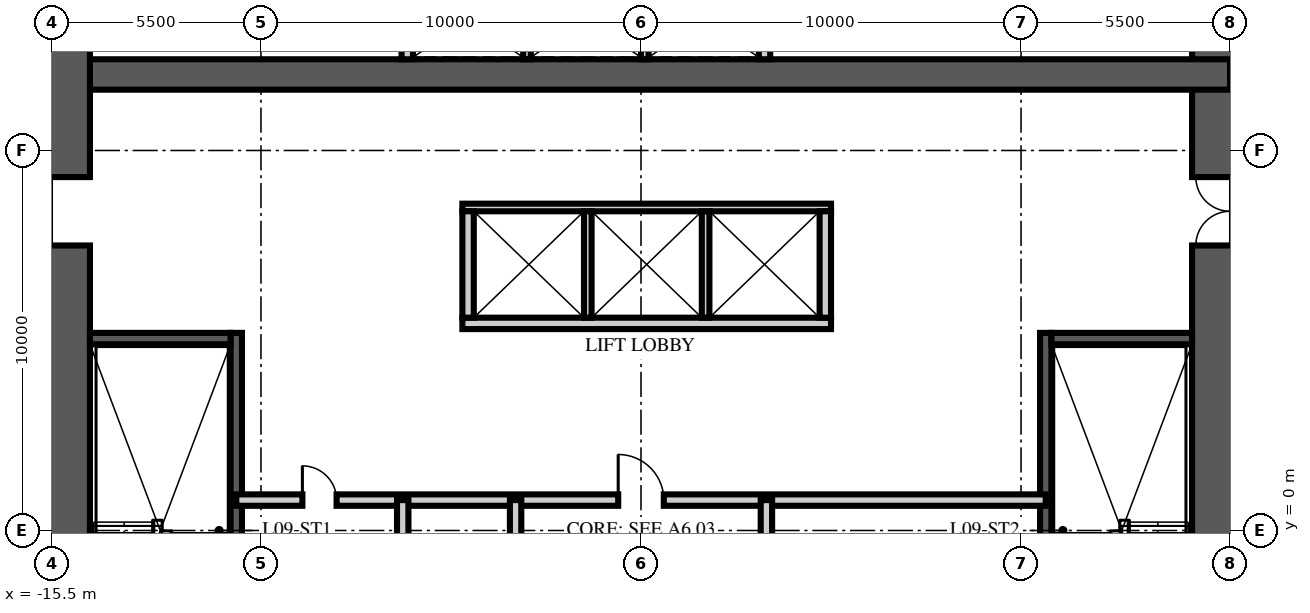
"""IFC4 building model, lengths in metres.
Left out: names, types, materials, properties, quantities, classifications, styles, units other than length and angle.
Written with IfcOpenShell. Run it as: python <this file> out.ifc"""

import sys

from ifc_helpers import new_model, si_unit, direction, frame, frame_2d, origin, place, context, subcontext, project, spatial, rectangle, extrude, element, fill, save


model = new_model("IFC4")
c1 = context("Model", 3, precision=1e-05, world=origin(), true_north=direction((0.0, 1.0)))
c2 = subcontext(c1, "Body", "Model", "MODEL_VIEW")
j1 = project(units=[si_unit("LENGTHUNIT", "METRE"), si_unit("PLANEANGLEUNIT", "RADIAN")], contexts=[c1])
p1 = place(None, origin())
s1 = spatial("IfcSite", under=j1, at=p1, CompositionType="ELEMENT")
p2 = place(p1, origin())
s2 = spatial("IfcBuilding", under=s1, at=p2, CompositionType="ELEMENT")
p3 = place(p2, frame((0.0, 0.0, 39.75)))
s3 = spatial("IfcBuildingStorey", under=s2, at=p3, CompositionType="ELEMENT", Elevation=39.75)
p4 = place(p3, frame((15.5, -15.5, -0.25), z_axis=(0.0, 0.0, 1.0), x_axis=(0.0, 1.0, 0.0)))
e1 = element("IfcWall", 1, at=p4, inside=s3, PredefinedType="SHEAR", context=c2, shape_type="SweptSolid", body=[
    extrude(rectangle(XDim=31.0, YDim=2.0, at=frame_2d((15.5, 0.0))), origin(), (0.0, 0.0, 1.0), 3.75),
])
p5 = place(p4, frame((6.5, 0.0, 0.25)))
e2 = element("IfcOpeningElement", 2, at=p5, cuts=e1, PredefinedType="OPENING", context=c2, shape_type="SweptSolid", body=[
    extrude(rectangle(XDim=1.2, YDim=2.1, at=frame_2d((0.6, 1.05))), frame((0.0, 1.01, 0.0), z_axis=(0.0, -1.0, 0.0), x_axis=(1.0, 0.0, 0.0)), (0.0, 0.0, 1.0), 2.02),
])
p6 = place(p4, frame((23.0, 0.0, 0.25)))
e3 = element("IfcOpeningElement", 3, at=p6, cuts=e1, PredefinedType="OPENING", context=c2, shape_type="SweptSolid", body=[
    extrude(rectangle(XDim=1.8, YDim=2.1, at=frame_2d((0.9, 1.05))), frame((0.0, 1.01, 0.0), z_axis=(0.0, -1.0, 0.0), x_axis=(1.0, 0.0, 0.0)), (0.0, 0.0, 1.0), 2.02),
])
p7 = place(p3, frame((-15.5, 12.0, -0.25), z_axis=(0.0, 0.0, 1.0), x_axis=(1.0, 0.0, 0.0)))
e4 = element("IfcWall", 4, at=p7, inside=s3, PredefinedType="SHEAR", context=c2, shape_type="SweptSolid", body=[
    extrude(rectangle(XDim=31.0, YDim=0.8, at=frame_2d((15.5, 0.0))), origin(), (0.0, 0.0, 1.0), 3.75),
])
p8 = place(p3, frame((-15.5, -15.5, -0.25), z_axis=(0.0, 0.0, 1.0), x_axis=(0.0, 1.0, 0.0)))
e5 = element("IfcWall", 5, at=p8, inside=s3, PredefinedType="SHEAR", context=c2, shape_type="SweptSolid", body=[
    extrude(rectangle(XDim=31.0, YDim=2.0, at=frame_2d((15.5, 0.0))), origin(), (0.0, 0.0, 1.0), 3.75),
])
p9 = place(p8, frame((6.5, 0.0, 0.25)))
e6 = element("IfcOpeningElement", 6, at=p9, cuts=e5, PredefinedType="OPENING", context=c2, shape_type="SweptSolid", body=[
    extrude(rectangle(XDim=1.2, YDim=2.1, at=frame_2d((0.6, 1.05))), frame((0.0, 1.01, 0.0), z_axis=(0.0, -1.0, 0.0), x_axis=(1.0, 0.0, 0.0)), (0.0, 0.0, 1.0), 2.02),
])
p10 = place(p8, frame((23.0, 0.0, 0.25)))
e7 = element("IfcOpeningElement", 7, at=p10, cuts=e5, PredefinedType="OPENING", context=c2, shape_type="SweptSolid", body=[
    extrude(rectangle(XDim=1.8, YDim=2.1, at=frame_2d((0.9, 1.05))), frame((0.0, 1.01, 0.0), z_axis=(0.0, -1.0, 0.0), x_axis=(1.0, 0.0, 0.0)), (0.0, 0.0, 1.0), 2.02),
])
p11 = place(p3, frame((-10.65, -4.9, 0.0), z_axis=(0.0, 0.0, 1.0), x_axis=(0.0, 1.0, 0.0)))
e8 = element("IfcWall", 8, at=p11, inside=s3, PredefinedType="SOLIDWALL", context=c2, shape_type="SweptSolid", body=[
    extrude(rectangle(XDim=10.1, YDim=0.3, at=frame_2d((5.05, 0.0))), origin(), (0.0, 0.0, 1.0), 3.5),
])
p12 = place(p3, frame((-14.5, 5.05, 0.0), z_axis=(0.0, 0.0, 1.0), x_axis=(1.0, 0.0, 0.0)))
e9 = element("IfcWall", 9, at=p12, inside=s3, PredefinedType="SOLIDWALL", context=c2, shape_type="SweptSolid", body=[
    extrude(rectangle(XDim=3.7, YDim=0.3, at=frame_2d((1.85, 0.0))), origin(), (0.0, 0.0, 1.0), 3.5),
])
p13 = place(p3, frame((10.65, -4.9, 0.0), z_axis=(0.0, 0.0, 1.0), x_axis=(0.0, 1.0, 0.0)))
e10 = element("IfcWall", 10, at=p13, inside=s3, PredefinedType="SOLIDWALL", context=c2, shape_type="SweptSolid", body=[
    extrude(rectangle(XDim=10.1, YDim=0.3, at=frame_2d((5.05, 0.0))), origin(), (0.0, 0.0, 1.0), 3.5),
])
p14 = place(p3, frame((14.5, 5.05, 0.0), z_axis=(0.0, 0.0, 1.0), x_axis=(-1.0, 0.0, 0.0)))
e11 = element("IfcWall", 11, at=p14, inside=s3, PredefinedType="SOLIDWALL", context=c2, shape_type="SweptSolid", body=[
    extrude(rectangle(XDim=3.7, YDim=0.3, at=frame_2d((1.85, 0.0))), origin(), (0.0, 0.0, 1.0), 3.5),
])
p15 = place(p3, frame((-4.7, 5.45, 0.0), z_axis=(0.0, 0.0, 1.0), x_axis=(1.0, 0.0, 0.0)))
e12 = element("IfcWall", 12, at=p15, inside=s3, PredefinedType="PARTITIONING", context=c2, shape_type="SweptSolid", body=[
    extrude(rectangle(XDim=9.7, YDim=0.3, at=frame_2d((4.85, 0.0))), origin(), (0.0, 0.0, 1.0), 3.5),
])
p16 = place(p3, frame((-4.7, 8.5, 0.0), z_axis=(0.0, 0.0, 1.0), x_axis=(1.0, 0.0, 0.0)))
e13 = element("IfcWall", 13, at=p16, inside=s3, PredefinedType="PARTITIONING", context=c2, shape_type="SweptSolid", body=[
    extrude(rectangle(XDim=9.7, YDim=0.2, at=frame_2d((4.85, 0.0))), origin(), (0.0, 0.0, 1.0), 3.5),
])
for number, where, z_axis, x_axis in (
    (14, (-4.55, 5.6, 0.0), (0.0, 0.0, 1.0), (0.0, 1.0, 0.0)),
    (15, (4.85, 5.6, 0.0), (0.0, 0.0, 1.0), (0.0, 1.0, 0.0)),
):
    element("IfcWall", number, at=place(p3, frame(where, z_axis=z_axis, x_axis=x_axis)), inside=s3, PredefinedType="PARTITIONING", context=c2, shape_type="SweptSolid", body=[
        extrude(rectangle(XDim=2.8, YDim=0.3, at=frame_2d((1.4, 0.0))), origin(), (0.0, 0.0, 1.0), 3.5),
    ])
for number, where, z_axis, x_axis in (
    (16, (-1.4, 5.6, 0.0), (0.0, 0.0, 1.0), (0.0, 1.0, 0.0)),
    (17, (1.7, 5.6, 0.0), (0.0, 0.0, 1.0), (0.0, 1.0, 0.0)),
):
    element("IfcWall", number, at=place(p3, frame(where, z_axis=z_axis, x_axis=x_axis)), inside=s3, PredefinedType="PARTITIONING", context=c2, shape_type="SweptSolid", body=[
        extrude(rectangle(XDim=2.8, YDim=0.2, at=frame_2d((1.4, 0.0))), origin(), (0.0, 0.0, 1.0), 3.5),
    ])
for number, where, z_axis, x_axis in (
    (18, (-6.15, 12.4, 0.0), (0.0, 0.0, 1.0), (0.0, 1.0, 0.0)),
    (19, (3.25, 12.4, 0.0), (0.0, 0.0, 1.0), (0.0, 1.0, 0.0)),
):
    element("IfcWall", number, at=place(p3, frame(where, z_axis=z_axis, x_axis=x_axis)), inside=s3, PredefinedType="PARTITIONING", context=c2, shape_type="SweptSolid", body=[
        extrude(rectangle(XDim=2.1, YDim=0.3, at=frame_2d((1.05, 0.0))), origin(), (0.0, 0.0, 1.0), 3.5),
    ])
for number, where, z_axis, x_axis in (
    (20, (-3.0, 12.4, 0.0), (0.0, 0.0, 1.0), (0.0, 1.0, 0.0)),
    (21, (0.1, 12.4, 0.0), (0.0, 0.0, 1.0), (0.0, 1.0, 0.0)),
):
    element("IfcWall", number, at=place(p3, frame(where, z_axis=z_axis, x_axis=x_axis)), inside=s3, PredefinedType="PARTITIONING", context=c2, shape_type="SweptSolid", body=[
        extrude(rectangle(XDim=2.1, YDim=0.2, at=frame_2d((1.05, 0.0))), origin(), (0.0, 0.0, 1.0), 3.5),
    ])
p17 = place(p3, frame((-10.65, 0.8, 0.0), z_axis=(0.0, 0.0, 1.0), x_axis=(1.0, 0.0, 0.0)))
e22 = element("IfcWall", 22, at=p17, inside=s3, PredefinedType="PARTITIONING", context=c2, shape_type="SweptSolid", body=[
    extrude(rectangle(XDim=21.3, YDim=0.3, at=frame_2d((10.65, 0.0))), origin(), (0.0, 0.0, 1.0), 3.5),
])
p18 = place(p17, frame((10.05, 0.0, 0.0)))
e23 = element("IfcOpeningElement", 23, at=p18, cuts=e22, PredefinedType="OPENING", context=c2, shape_type="SweptSolid", body=[
    extrude(rectangle(XDim=1.2, YDim=2.1, at=frame_2d((0.6, 1.05))), frame((0.0, 0.16, 0.0), z_axis=(0.0, -1.0, 0.0), x_axis=(1.0, 0.0, 0.0)), (0.0, 0.0, 1.0), 0.32),
])
p19 = place(p17, frame((1.74, 0.0, 0.0)))
e24 = element("IfcOpeningElement", 24, at=p19, cuts=e22, PredefinedType="OPENING", context=c2, shape_type="SweptSolid", body=[
    extrude(rectangle(XDim=0.9, YDim=2.1, at=frame_2d((0.45, 1.05))), frame((0.0, 0.16, 0.0), z_axis=(0.0, -1.0, 0.0), x_axis=(1.0, 0.0, 0.0)), (0.0, 0.0, 1.0), 0.32),
])
p20 = place(p3, frame((-3.3, -6.65, 0.0), z_axis=(0.0, 0.0, 1.0), x_axis=(0.0, 1.0, 0.0)))
e25 = element("IfcWall", 25, at=p20, inside=s3, PredefinedType="PARTITIONING", context=c2, shape_type="SweptSolid", body=[
    extrude(rectangle(XDim=7.45, YDim=0.3, at=frame_2d((3.725, 0.0))), origin(), (0.0, 0.0, 1.0), 3.5),
])
p21 = place(p20, frame((3.275, 0.0, 0.0)))
e26 = element("IfcOpeningElement", 26, at=p21, cuts=e25, PredefinedType="OPENING", context=c2, shape_type="SweptSolid", body=[
    extrude(rectangle(XDim=0.9, YDim=2.1, at=frame_2d((0.45, 1.05))), frame((0.0, 0.16, 0.0), z_axis=(0.0, -1.0, 0.0), x_axis=(1.0, 0.0, 0.0)), (0.0, 0.0, 1.0), 0.32),
])
p22 = place(p3, frame((3.3, -6.65, 0.0), z_axis=(0.0, 0.0, 1.0), x_axis=(0.0, 1.0, 0.0)))
e27 = element("IfcWall", 27, at=p22, inside=s3, PredefinedType="PARTITIONING", context=c2, shape_type="SweptSolid", body=[
    extrude(rectangle(XDim=7.45, YDim=0.3, at=frame_2d((3.725, 0.0))), origin(), (0.0, 0.0, 1.0), 3.5),
])
p23 = place(p22, frame((1.231, 0.0, 0.0)))
e28 = element("IfcOpeningElement", 28, at=p23, cuts=e27, PredefinedType="OPENING", context=c2, shape_type="SweptSolid", body=[
    extrude(rectangle(XDim=0.9, YDim=2.1, at=frame_2d((0.45, 1.05))), frame((0.0, 0.16, 0.0), z_axis=(0.0, -1.0, 0.0), x_axis=(1.0, 0.0, 0.0)), (0.0, 0.0, 1.0), 0.32),
])
p24 = place(p22, frame((4.956, 0.0, 0.0)))
e29 = element("IfcOpeningElement", 29, at=p24, cuts=e27, PredefinedType="OPENING", context=c2, shape_type="SweptSolid", body=[
    extrude(rectangle(XDim=0.9, YDim=2.1, at=frame_2d((0.45, 1.05))), frame((0.0, 0.16, 0.0), z_axis=(0.0, -1.0, 0.0), x_axis=(1.0, 0.0, 0.0)), (0.0, 0.0, 1.0), 0.32),
])
p25 = place(p3, frame((-6.27, -6.65, 0.0), z_axis=(0.0, 0.0, 1.0), x_axis=(0.0, 1.0, 0.0)))
e30 = element("IfcWall", 30, at=p25, inside=s3, PredefinedType="PARTITIONING", context=c2, shape_type="SweptSolid", body=[
    extrude(rectangle(XDim=7.45, YDim=0.3, at=frame_2d((3.725, 0.0))), origin(), (0.0, 0.0, 1.0), 3.5),
])
p26 = place(p10, origin())
e31 = element("IfcDoor", 31, at=p26, inside=s3, OperationType="DOUBLE_DOOR_SINGLE_SWING", PredefinedType="DOOR", context=c2, shape_type="SweptSolid", body=[
    extrude(rectangle(XDim=1.8, YDim=2.1, at=frame_2d((0.9, 1.05))), frame((0.0, 0.025, 0.0), z_axis=(0.0, -1.0, 0.0), x_axis=(1.0, 0.0, 0.0)), (0.0, 0.0, 1.0), 0.05),
])
fill(e7, e31)
p27 = place(p6, origin())
e32 = element("IfcDoor", 32, at=p27, inside=s3, OperationType="DOUBLE_DOOR_SINGLE_SWING", PredefinedType="DOOR", context=c2, shape_type="SweptSolid", body=[
    extrude(rectangle(XDim=1.8, YDim=2.1, at=frame_2d((0.9, 1.05))), frame((0.0, 0.025, 0.0), z_axis=(0.0, -1.0, 0.0), x_axis=(1.0, 0.0, 0.0)), (0.0, 0.0, 1.0), 0.05),
])
fill(e3, e32)
p28 = place(p18, origin())
e33 = element("IfcDoor", 33, at=p28, inside=s3, OperationType="SINGLE_SWING_LEFT", PredefinedType="DOOR", context=c2, shape_type="SweptSolid", body=[
    extrude(rectangle(XDim=1.2, YDim=2.1, at=frame_2d((0.6, 1.05))), frame((0.0, 0.025, 0.0), z_axis=(0.0, -1.0, 0.0), x_axis=(1.0, 0.0, 0.0)), (0.0, 0.0, 1.0), 0.05),
])
fill(e23, e33)
p29 = place(p19, origin())
e34 = element("IfcDoor", 34, at=p29, inside=s3, OperationType="SINGLE_SWING_LEFT", PredefinedType="DOOR", context=c2, shape_type="SweptSolid", body=[
    extrude(rectangle(XDim=0.9, YDim=2.1, at=frame_2d((0.45, 1.05))), frame((0.0, 0.025, 0.0), z_axis=(0.0, -1.0, 0.0), x_axis=(1.0, 0.0, 0.0)), (0.0, 0.0, 1.0), 0.05),
])
fill(e24, e34)
save(model, sys.argv[1])
